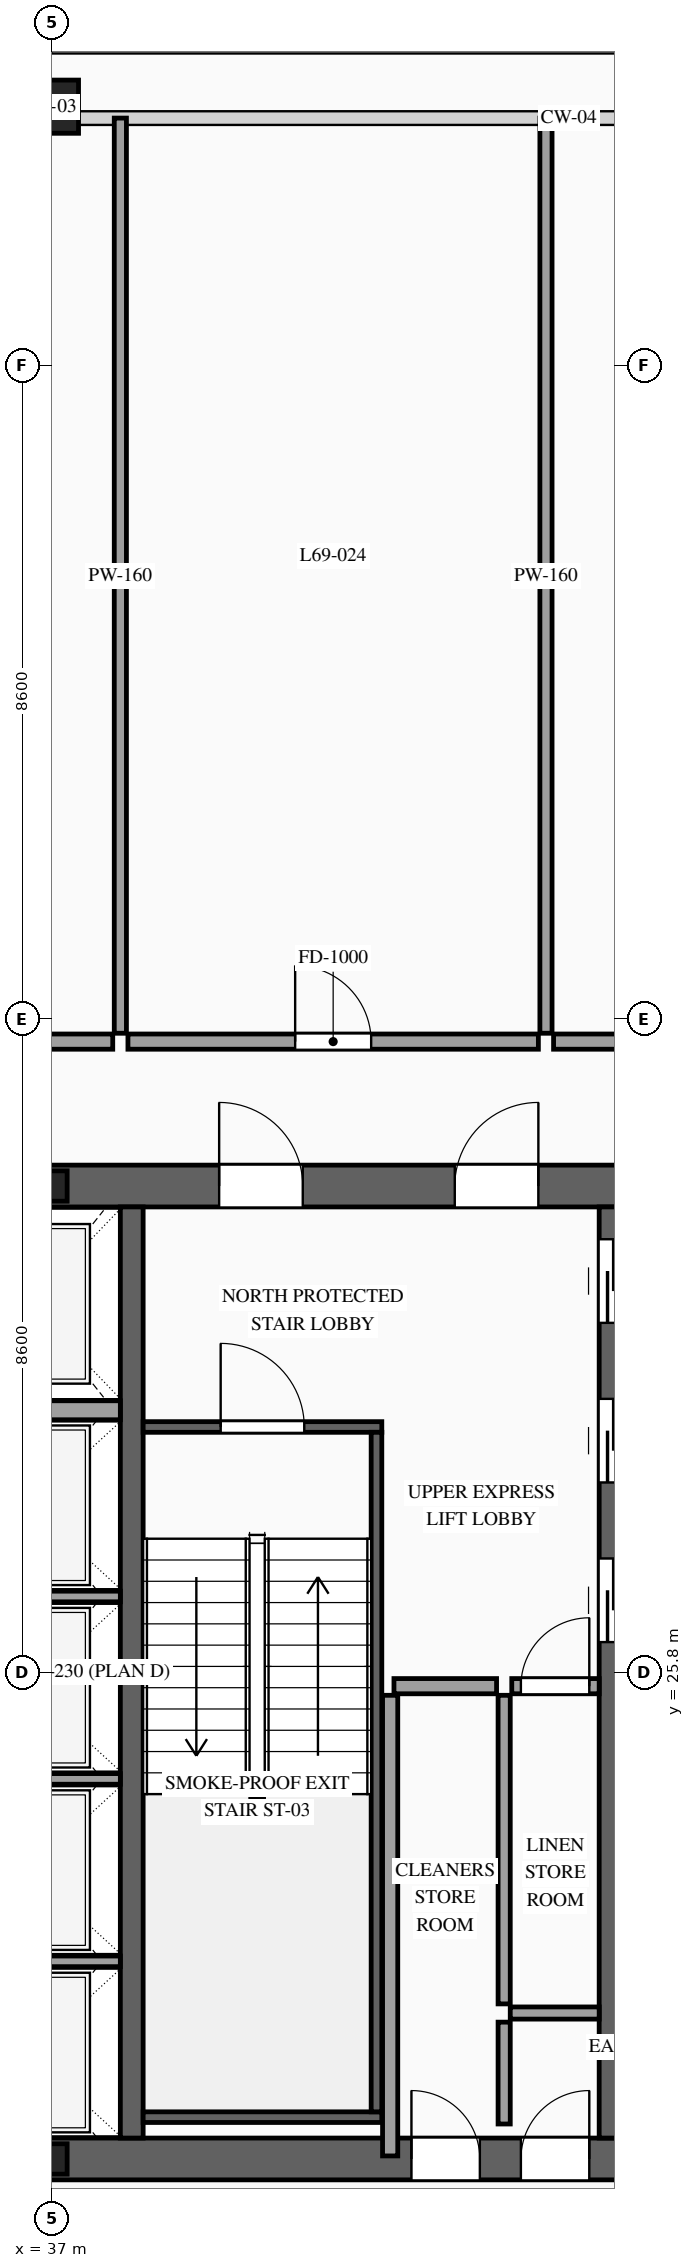
"""IFC4 building model, lengths in metres.
Left out: names, types, materials, properties, quantities, classifications, styles, units other than length and angle.
Written with IfcOpenShell. Run it as: python <this file> out.ifc"""

import sys

from ifc_helpers import new_model, si_unit, direction, frame, frame_2d, origin, origin_2d, place, context, subcontext, project, spatial, rectangle, hollow_rectangle, i_section, extrude, source, transform, mapped, element, fill, save


model = new_model("IFC4")
c1 = context("Model", 3, precision=1e-05, world=origin(), true_north=direction((0.0, 1.0)))
c2 = subcontext(c1, "Body", "Model", "MODEL_VIEW")
j1 = project(units=[si_unit("LENGTHUNIT", "METRE"), si_unit("PLANEANGLEUNIT", "RADIAN")], contexts=[c1])
p1 = place(None, origin())
s1 = spatial("IfcSite", under=j1, at=p1, CompositionType="ELEMENT")
p2 = place(p1, origin())
s2 = spatial("IfcBuilding", under=s1, at=p2, CompositionType="ELEMENT")
p3 = place(p2, frame((0.0, 0.0, 259.1)))
s3 = spatial("IfcBuildingStorey", under=s2, at=p3, CompositionType="ELEMENT", Elevation=259.1)
p4 = place(p3, frame((23.525, 19.4, 0.0), z_axis=(0.0, 0.0, 1.0), x_axis=(1.0, 0.0, 0.0)))
e1 = element("IfcWall", 1, at=p4, inside=s3, PredefinedType="SHEAR", context=c2, shape_type="SweptSolid", body=[
    extrude(rectangle(XDim=26.95, YDim=0.55, at=frame_2d((13.475, 0.0))), origin(), (0.0, 0.0, 1.0), 4.4),
])
p5 = place(p4, frame((1.925, 0.0, 0.0)))
e2 = element("IfcOpeningElement", 2, at=p5, cuts=e1, PredefinedType="OPENING", context=c2, shape_type="SweptSolid", body=[
    extrude(rectangle(XDim=1.1, YDim=2.2, at=frame_2d((0.55, 1.1))), frame((0.0, 0.29, 0.0), z_axis=(0.0, -1.0, 0.0), x_axis=(1.0, 0.0, 0.0)), (0.0, 0.0, 1.0), 0.58),
])
p6 = place(p4, frame((9.825, 0.0, 0.0)))
e3 = element("IfcOpeningElement", 3, at=p6, cuts=e1, PredefinedType="OPENING", context=c2, shape_type="SweptSolid", body=[
    extrude(rectangle(XDim=1.1, YDim=2.2, at=frame_2d((0.55, 1.1))), frame((0.0, 0.29, 0.0), z_axis=(0.0, -1.0, 0.0), x_axis=(1.0, 0.0, 0.0)), (0.0, 0.0, 1.0), 0.58),
])
p7 = place(p4, frame((23.025, 0.0, 0.0)))
e4 = element("IfcOpeningElement", 4, at=p7, cuts=e1, PredefinedType="OPENING", context=c2, shape_type="SweptSolid", body=[
    extrude(rectangle(XDim=1.1, YDim=2.2, at=frame_2d((0.55, 1.1))), frame((0.0, 0.29, 0.0), z_axis=(0.0, -1.0, 0.0), x_axis=(1.0, 0.0, 0.0)), (0.0, 0.0, 1.0), 0.58),
])
p8 = place(p4, frame((19.645, 0.0, 0.0)))
e5 = element("IfcOpeningElement", 5, at=p8, cuts=e1, PredefinedType="OPENING", context=c2, shape_type="SweptSolid", body=[
    extrude(rectangle(XDim=0.9, YDim=2.15, at=frame_2d((0.45, 1.075))), frame((0.0, 0.29, 0.0), z_axis=(0.0, -1.0, 0.0), x_axis=(1.0, 0.0, 0.0)), (0.0, 0.0, 1.0), 0.58),
])
p9 = place(p4, frame((18.205, 0.0, 0.0)))
e6 = element("IfcOpeningElement", 6, at=p9, cuts=e1, PredefinedType="OPENING", context=c2, shape_type="SweptSolid", body=[
    extrude(rectangle(XDim=0.9, YDim=2.15, at=frame_2d((0.45, 1.075))), frame((0.0, 0.29, 0.0), z_axis=(0.0, -1.0, 0.0), x_axis=(1.0, 0.0, 0.0)), (0.0, 0.0, 1.0), 0.58),
])
p10 = place(p3, frame((23.525, 32.2, 0.0), z_axis=(0.0, 0.0, 1.0), x_axis=(1.0, 0.0, 0.0)))
e7 = element("IfcWall", 7, at=p10, inside=s3, PredefinedType="SHEAR", context=c2, shape_type="SweptSolid", body=[
    extrude(rectangle(XDim=26.95, YDim=0.55, at=frame_2d((13.475, 0.0))), origin(), (0.0, 0.0, 1.0), 4.4),
])
p11 = place(p10, frame((4.545, 0.0, 0.0)))
e8 = element("IfcOpeningElement", 8, at=p11, cuts=e7, PredefinedType="OPENING", context=c2, shape_type="SweptSolid", body=[
    extrude(rectangle(XDim=0.9, YDim=2.15, at=frame_2d((0.45, 1.075))), frame((0.0, 0.29, 0.0), z_axis=(0.0, -1.0, 0.0), x_axis=(1.0, 0.0, 0.0)), (0.0, 0.0, 1.0), 0.58),
])
p12 = place(p10, frame((9.825, 0.0, 0.0)))
e9 = element("IfcOpeningElement", 9, at=p12, cuts=e7, PredefinedType="OPENING", context=c2, shape_type="SweptSolid", body=[
    extrude(rectangle(XDim=1.1, YDim=2.2, at=frame_2d((0.55, 1.1))), frame((0.0, 0.29, 0.0), z_axis=(0.0, -1.0, 0.0), x_axis=(1.0, 0.0, 0.0)), (0.0, 0.0, 1.0), 0.58),
])
p13 = place(p10, frame((15.675, 0.0, 0.0)))
e10 = element("IfcOpeningElement", 10, at=p13, cuts=e7, PredefinedType="OPENING", context=c2, shape_type="SweptSolid", body=[
    extrude(rectangle(XDim=1.1, YDim=2.2, at=frame_2d((0.55, 1.1))), frame((0.0, 0.29, 0.0), z_axis=(0.0, -1.0, 0.0), x_axis=(1.0, 0.0, 0.0)), (0.0, 0.0, 1.0), 0.58),
])
p14 = place(p10, frame((18.775, 0.0, 0.0)))
e11 = element("IfcOpeningElement", 11, at=p14, cuts=e7, PredefinedType="OPENING", context=c2, shape_type="SweptSolid", body=[
    extrude(rectangle(XDim=1.1, YDim=2.2, at=frame_2d((0.55, 1.1))), frame((0.0, 0.29, 0.0), z_axis=(0.0, -1.0, 0.0), x_axis=(1.0, 0.0, 0.0)), (0.0, 0.0, 1.0), 0.58),
])
m1 = source(origin(), c2, "Body", "SweptSolid", [
    extrude(rectangle(XDim=12.25, YDim=0.3, at=frame_2d((6.125, 0.0))), origin(), (0.0, 0.0, 1.0), 4.4),
])
p15 = place(p3, frame((38.05, 19.675, 0.0), z_axis=(0.0, 0.0, 1.0), x_axis=(0.0, 1.0, 0.0)))
e12 = element("IfcWall", 12, at=p15, inside=s3, PredefinedType="SOLIDWALL", context=c2, shape_type="MappedRepresentation", body=[
    mapped(m1, transform((0.0, 0.0, 0.0), scale=1.0)),
])
p16 = place(p3, frame((44.35, 19.675, 0.0), z_axis=(0.0, 0.0, 1.0), x_axis=(0.0, 1.0, 0.0)))
e13 = element("IfcWall", 13, at=p16, inside=s3, PredefinedType="SOLIDWALL", context=c2, shape_type="SweptSolid", body=[
    extrude(rectangle(XDim=12.25, YDim=0.3, at=frame_2d((6.125, 0.0))), origin(), (0.0, 0.0, 1.0), 4.4),
])
p17 = place(p16, frame((6.525, 0.0, 0.0)))
e14 = element("IfcOpeningElement", 14, at=p17, cuts=e13, PredefinedType="OPENING", context=c2, shape_type="SweptSolid", body=[
    extrude(rectangle(XDim=1.1, YDim=2.2, at=frame_2d((0.55, 1.1))), frame((0.0, 0.165, 0.0), z_axis=(0.0, -1.0, 0.0), x_axis=(1.0, 0.0, 0.0)), (0.0, 0.0, 1.0), 0.33),
])
p18 = place(p16, frame((8.625, 0.0, 0.0)))
e15 = element("IfcOpeningElement", 15, at=p18, cuts=e13, PredefinedType="OPENING", context=c2, shape_type="SweptSolid", body=[
    extrude(rectangle(XDim=1.1, YDim=2.2, at=frame_2d((0.55, 1.1))), frame((0.0, 0.165, 0.0), z_axis=(0.0, -1.0, 0.0), x_axis=(1.0, 0.0, 0.0)), (0.0, 0.0, 1.0), 0.33),
])
p19 = place(p16, frame((10.725, 0.0, 0.0)))
e16 = element("IfcOpeningElement", 16, at=p19, cuts=e13, PredefinedType="OPENING", context=c2, shape_type="SweptSolid", body=[
    extrude(rectangle(XDim=1.1, YDim=2.2, at=frame_2d((0.55, 1.1))), frame((0.0, 0.165, 0.0), z_axis=(0.0, -1.0, 0.0), x_axis=(1.0, 0.0, 0.0)), (0.0, 0.0, 1.0), 0.33),
])
m2 = source(origin(), c2, "Body", "SweptSolid", [
    extrude(i_section(OverallWidth=0.4, OverallDepth=0.4, WebThickness=0.013, FlangeThickness=0.021, at=origin_2d()), origin(), (0.0, 0.0, 1.0), 4.4),
])
for number, where, z_axis, x_axis in (
    (17, (37.0, 19.4, 0.0), (0.0, 0.0, 1.0), (1.0, 0.0, 0.0)),
    (18, (37.0, 32.2, 0.0), (0.0, 0.0, 1.0), (1.0, 0.0, 0.0)),
):
    element("IfcColumn", number, at=place(p3, frame(where, z_axis=z_axis, x_axis=x_axis)), inside=s3, PredefinedType="COLUMN", context=c2, shape_type="MappedRepresentation", body=[
        mapped(m2, transform((0.0, 0.0, 0.0), scale=1.0)),
    ])
m3 = source(origin(), c2, "Body", "SweptSolid", [
    extrude(hollow_rectangle(XDim=0.7, YDim=0.7, WallThickness=0.032, at=origin_2d()), origin(), (0.0, 0.0, 1.0), 4.4),
])
p20 = place(p3, frame((37.0, 46.4, 0.0), z_axis=(0.0, 0.0, 1.0), x_axis=(1.0, 0.0, 0.0)))
e19 = element("IfcColumn", 19, at=p20, inside=s3, PredefinedType="COLUMN", context=c2, shape_type="MappedRepresentation", body=[
    mapped(m3, transform((0.0, 0.0, 0.0), scale=1.0)),
])
m4 = source(origin(), c2, "Body", "SweptSolid", [
    extrude(rectangle(XDim=2.4, YDim=0.14, at=frame_2d((1.2, 0.0))), origin(), (0.0, 0.0, 1.0), 4.12),
])
for number, where, z_axis, x_axis in (
    (20, (35.5, 22.0, 0.0), (0.0, 0.0, 1.0), (1.0, 0.0, 0.0)),
    (21, (35.5, 24.4, 0.0), (0.0, 0.0, 1.0), (1.0, 0.0, 0.0)),
    (22, (35.5, 26.8, 0.0), (0.0, 0.0, 1.0), (1.0, 0.0, 0.0)),
):
    element("IfcWall", number, at=place(p3, frame(where, z_axis=z_axis, x_axis=x_axis)), inside=s3, PredefinedType="SOLIDWALL", context=c2, shape_type="MappedRepresentation", body=[
        mapped(m4, transform((0.0, 0.0, 0.0), scale=1.0)),
    ])
m5 = source(origin(), c2, "Body", "SweptSolid", [
    extrude(rectangle(XDim=2.4, YDim=0.25, at=frame_2d((1.2, 0.0))), origin(), (0.0, 0.0, 1.0), 4.12),
])
p21 = place(p3, frame((35.5, 29.25, 0.0), z_axis=(0.0, 0.0, 1.0), x_axis=(1.0, 0.0, 0.0)))
e23 = element("IfcWall", 23, at=p21, inside=s3, PredefinedType="SOLIDWALL", context=c2, shape_type="MappedRepresentation", body=[
    mapped(m5, transform((0.0, 0.0, 0.0), scale=1.0)),
])
p22 = place(p3, frame((38.2, 29.03, 0.0), z_axis=(0.0, 0.0, 1.0), x_axis=(1.0, 0.0, 0.0)))
e24 = element("IfcWall", 24, at=p22, inside=s3, PredefinedType="SOLIDWALL", context=c2, shape_type="SweptSolid", body=[
    extrude(rectangle(XDim=3.14, YDim=0.14, at=frame_2d((1.57, 0.0))), origin(), (0.0, 0.0, 1.0), 4.12),
])
p23 = place(p22, frame((1.02, 0.0, 0.0)))
e25 = element("IfcOpeningElement", 25, at=p23, cuts=e24, PredefinedType="OPENING", context=c2, shape_type="SweptSolid", body=[
    extrude(rectangle(XDim=1.1, YDim=2.2, at=frame_2d((0.55, 1.1))), frame((0.0, 0.085, 0.0), z_axis=(0.0, -1.0, 0.0), x_axis=(1.0, 0.0, 0.0)), (0.0, 0.0, 1.0), 0.17),
])
m6 = source(origin(), c2, "Body", "SweptSolid", [
    extrude(rectangle(XDim=3.14, YDim=0.14, at=frame_2d((1.57, 0.0))), origin(), (0.0, 0.0, 1.0), 4.12),
])
p24 = place(p3, frame((38.2, 19.95, 0.0), z_axis=(0.0, 0.0, 1.0), x_axis=(1.0, 0.0, 0.0)))
e26 = element("IfcWall", 26, at=p24, inside=s3, PredefinedType="SOLIDWALL", context=c2, shape_type="MappedRepresentation", body=[
    mapped(m6, transform((0.0, 0.0, 0.0), scale=1.0)),
])
m7 = source(origin(), c2, "Body", "SweptSolid", [
    extrude(rectangle(XDim=8.94, YDim=0.14, at=frame_2d((4.47, 0.0))), origin(), (0.0, 0.0, 1.0), 4.12),
])
p25 = place(p3, frame((41.27, 20.02, 0.0), z_axis=(0.0, 0.0, 1.0), x_axis=(0.0, 1.0, 0.0)))
e27 = element("IfcWall", 27, at=p25, inside=s3, PredefinedType="SOLIDWALL", context=c2, shape_type="MappedRepresentation", body=[
    mapped(m7, transform((0.0, 0.0, 0.0), scale=1.0)),
])
m8 = source(origin(), c2, "Body", "SweptSolid", [
    extrude(rectangle(XDim=1.34, YDim=0.16, at=frame_2d((0.67, 0.0))), origin(), (0.0, 0.0, 1.0), 4.12),
])
p26 = place(p3, frame((42.95, 19.86, 0.0), z_axis=(0.0, 0.0, 1.0), x_axis=(0.0, 1.0, 0.0)))
e28 = element("IfcWall", 28, at=p26, inside=s3, PredefinedType="PARTITIONING", context=c2, shape_type="MappedRepresentation", body=[
    mapped(m8, transform((0.0, 0.0, 0.0), scale=1.0)),
])
m9 = source(origin(), c2, "Body", "SweptSolid", [
    extrude(rectangle(XDim=1.17, YDim=0.16, at=frame_2d((0.585, 0.0))), origin(), (0.0, 0.0, 1.0), 4.12),
])
p27 = place(p3, frame((43.03, 21.32, 0.0), z_axis=(0.0, 0.0, 1.0), x_axis=(1.0, 0.0, 0.0)))
e29 = element("IfcWall", 29, at=p27, inside=s3, PredefinedType="PARTITIONING", context=c2, shape_type="MappedRepresentation", body=[
    mapped(m9, transform((0.0, 0.0, 0.0), scale=1.0)),
])
m10 = source(origin(), c2, "Body", "SweptSolid", [
    extrude(rectangle(XDim=6.06, YDim=0.2, at=frame_2d((3.03, 0.0))), origin(), (0.0, 0.0, 1.0), 4.12),
])
p28 = place(p3, frame((41.45, 19.44, 0.0), z_axis=(0.0, 0.0, 1.0), x_axis=(0.0, 1.0, 0.0)))
e30 = element("IfcWall", 30, at=p28, inside=s3, PredefinedType="PARTITIONING", context=c2, shape_type="MappedRepresentation", body=[
    mapped(m10, transform((0.0, 0.0, 0.0), scale=1.0)),
])
m11 = source(origin(), c2, "Body", "SweptSolid", [
    extrude(rectangle(XDim=1.35, YDim=0.2, at=frame_2d((0.675, 0.0))), origin(), (0.0, 0.0, 1.0), 4.12),
])
p29 = place(p3, frame((41.5, 25.62, 0.0), z_axis=(0.0, 0.0, 1.0), x_axis=(1.0, 0.0, 0.0)))
e31 = element("IfcWall", 31, at=p29, inside=s3, PredefinedType="PARTITIONING", context=c2, shape_type="MappedRepresentation", body=[
    mapped(m11, transform((0.0, 0.0, 0.0), scale=1.0)),
])
m12 = source(origin(), c2, "Body", "SweptSolid", [
    extrude(rectangle(XDim=4.06, YDim=0.16, at=frame_2d((2.03, 0.0))), origin(), (0.0, 0.0, 1.0), 4.12),
])
p30 = place(p3, frame((42.95, 21.44, 0.0), z_axis=(0.0, 0.0, 1.0), x_axis=(0.0, 1.0, 0.0)))
e32 = element("IfcWall", 32, at=p30, inside=s3, PredefinedType="PARTITIONING", context=c2, shape_type="MappedRepresentation", body=[
    mapped(m12, transform((0.0, 0.0, 0.0), scale=1.0)),
])
p31 = place(p3, frame((43.05, 25.62, 0.0), z_axis=(0.0, 0.0, 1.0), x_axis=(1.0, 0.0, 0.0)))
e33 = element("IfcWall", 33, at=p31, inside=s3, PredefinedType="PARTITIONING", context=c2, shape_type="SweptSolid", body=[
    extrude(rectangle(XDim=1.15, YDim=0.2, at=frame_2d((0.575, 0.0))), origin(), (0.0, 0.0, 1.0), 4.12),
])
p32 = place(p31, frame((0.12, 0.0, 0.0)))
e34 = element("IfcOpeningElement", 34, at=p32, cuts=e33, PredefinedType="OPENING", context=c2, shape_type="SweptSolid", body=[
    extrude(rectangle(XDim=0.9, YDim=2.15, at=frame_2d((0.45, 1.075))), frame((0.0, 0.115, 0.0), z_axis=(0.0, -1.0, 0.0), x_axis=(1.0, 0.0, 0.0)), (0.0, 0.0, 1.0), 0.23),
])
p33 = place(p3, frame((34.2, 34.1, 0.0), z_axis=(0.0, 0.0, 1.0), x_axis=(1.0, 0.0, 0.0)))
e35 = element("IfcWall", 35, at=p33, inside=s3, PredefinedType="PARTITIONING", context=c2, shape_type="SweptSolid", body=[
    extrude(rectangle(XDim=3.6, YDim=0.2, at=frame_2d((1.8, 0.0))), origin(), (0.0, 0.0, 1.0), 4.12),
])
p34 = place(p33, frame((1.3, 0.0, 0.0)))
e36 = element("IfcOpeningElement", 36, at=p34, cuts=e35, PredefinedType="OPENING", context=c2, shape_type="SweptSolid", body=[
    extrude(rectangle(XDim=1.0, YDim=2.2, at=frame_2d((0.5, 1.1))), frame((0.0, 0.115, 0.0), z_axis=(0.0, -1.0, 0.0), x_axis=(1.0, 0.0, 0.0)), (0.0, 0.0, 1.0), 0.23),
])
m13 = source(origin(), c2, "Body", "SweptSolid", [
    extrude(rectangle(XDim=12.04, YDim=0.16, at=frame_2d((6.02, 0.0))), origin(), (0.0, 0.0, 1.0), 4.12),
])
p35 = place(p3, frame((37.9, 34.21, 0.0), z_axis=(0.0, 0.0, 1.0), x_axis=(0.0, 1.0, 0.0)))
e37 = element("IfcWall", 37, at=p35, inside=s3, PredefinedType="PARTITIONING", context=c2, shape_type="MappedRepresentation", body=[
    mapped(m13, transform((0.0, 0.0, 0.0), scale=1.0)),
])
p36 = place(p3, frame((38.0, 34.1, 0.0), z_axis=(0.0, 0.0, 1.0), x_axis=(1.0, 0.0, 0.0)))
e38 = element("IfcWall", 38, at=p36, inside=s3, PredefinedType="PARTITIONING", context=c2, shape_type="SweptSolid", body=[
    extrude(rectangle(XDim=5.4, YDim=0.2, at=frame_2d((2.7, 0.0))), origin(), (0.0, 0.0, 1.0), 4.12),
])
p37 = place(p36, frame((2.2, 0.0, 0.0)))
e39 = element("IfcOpeningElement", 39, at=p37, cuts=e38, PredefinedType="OPENING", context=c2, shape_type="SweptSolid", body=[
    extrude(rectangle(XDim=1.0, YDim=2.2, at=frame_2d((0.5, 1.1))), frame((0.0, 0.115, 0.0), z_axis=(0.0, -1.0, 0.0), x_axis=(1.0, 0.0, 0.0)), (0.0, 0.0, 1.0), 0.23),
])
p38 = place(p3, frame((43.5, 34.21, 0.0), z_axis=(0.0, 0.0, 1.0), x_axis=(0.0, 1.0, 0.0)))
e40 = element("IfcWall", 40, at=p38, inside=s3, PredefinedType="PARTITIONING", context=c2, shape_type="MappedRepresentation", body=[
    mapped(m13, transform((0.0, 0.0, 0.0), scale=1.0)),
])
p39 = place(p3, frame((43.6, 34.1, 0.0), z_axis=(0.0, 0.0, 1.0), x_axis=(1.0, 0.0, 0.0)))
e41 = element("IfcWall", 41, at=p39, inside=s3, PredefinedType="PARTITIONING", context=c2, shape_type="SweptSolid", body=[
    extrude(rectangle(XDim=4.4, YDim=0.2, at=frame_2d((2.2, 0.0))), origin(), (0.0, 0.0, 1.0), 4.12),
])
p40 = place(p39, frame((1.7, 0.0, 0.0)))
e42 = element("IfcOpeningElement", 42, at=p40, cuts=e41, PredefinedType="OPENING", context=c2, shape_type="SweptSolid", body=[
    extrude(rectangle(XDim=1.0, YDim=2.2, at=frame_2d((0.5, 1.1))), frame((0.0, 0.115, 0.0), z_axis=(0.0, -1.0, 0.0), x_axis=(1.0, 0.0, 0.0)), (0.0, 0.0, 1.0), 0.23),
])
m14 = source(origin(), c2, "Body", "SweptSolid", [
    extrude(rectangle(XDim=1.1, YDim=2.2, at=frame_2d((0.55, 1.1))), frame((0.0, 0.025, 0.0), z_axis=(0.0, -1.0, 0.0), x_axis=(1.0, 0.0, 0.0)), (0.0, 0.0, 1.0), 0.05),
])
p41 = place(p17, origin())
e43 = element("IfcDoor", 43, at=p41, inside=s3, OperationType="SLIDING_TO_LEFT", PredefinedType="DOOR", context=c2, shape_type="MappedRepresentation", body=[
    mapped(m14, transform((0.0, 0.0, 0.0), scale=1.0)),
])
fill(e14, e43)
p42 = place(p18, origin())
e44 = element("IfcDoor", 44, at=p42, inside=s3, OperationType="SLIDING_TO_RIGHT", PredefinedType="DOOR", context=c2, shape_type="MappedRepresentation", body=[
    mapped(m14, transform((0.0, 0.0, 0.0), scale=1.0)),
])
fill(e15, e44)
p43 = place(p19, origin())
e45 = element("IfcDoor", 45, at=p43, inside=s3, OperationType="SLIDING_TO_LEFT", PredefinedType="DOOR", context=c2, shape_type="MappedRepresentation", body=[
    mapped(m14, transform((0.0, 0.0, 0.0), scale=1.0)),
])
fill(e16, e45)
m15 = source(origin(), c2, "Body", "SweptSolid", [
    extrude(rectangle(XDim=1.1, YDim=2.2, at=frame_2d((0.55, 1.1))), frame((0.0, 0.025, 0.0), z_axis=(0.0, -1.0, 0.0), x_axis=(1.0, 0.0, 0.0)), (0.0, 0.0, 1.0), 0.05),
])
p44 = place(p23, origin())
e46 = element("IfcDoor", 46, at=p44, inside=s3, OperationType="SINGLE_SWING_LEFT", PredefinedType="DOOR", context=c2, shape_type="MappedRepresentation", body=[
    mapped(m15, transform((0.0, 0.0, 0.0), scale=1.0)),
])
fill(e25, e46)
p45 = place(p13, origin())
e47 = element("IfcDoor", 47, at=p45, inside=s3, OperationType="SINGLE_SWING_LEFT", PredefinedType="DOOR", context=c2, shape_type="MappedRepresentation", body=[
    mapped(m15, transform((0.0, 0.0, 0.0), scale=1.0)),
])
fill(e10, e47)
p46 = place(p14, origin())
e48 = element("IfcDoor", 48, at=p46, inside=s3, OperationType="SINGLE_SWING_RIGHT", PredefinedType="DOOR", context=c2, shape_type="MappedRepresentation", body=[
    mapped(m15, transform((0.0, 0.0, 0.0), scale=1.0)),
])
fill(e11, e48)
m16 = source(origin(), c2, "Body", "SweptSolid", [
    extrude(rectangle(XDim=0.9, YDim=2.15, at=frame_2d((0.45, 1.075))), frame((0.0, 0.025, 0.0), z_axis=(0.0, -1.0, 0.0), x_axis=(1.0, 0.0, 0.0)), (0.0, 0.0, 1.0), 0.05),
])
p47 = place(p8, origin())
e49 = element("IfcDoor", 49, at=p47, inside=s3, OperationType="SINGLE_SWING_RIGHT", PredefinedType="DOOR", context=c2, shape_type="MappedRepresentation", body=[
    mapped(m16, transform((0.0, 0.0, 0.0), scale=1.0)),
])
fill(e5, e49)
p48 = place(p9, origin())
e50 = element("IfcDoor", 50, at=p48, inside=s3, OperationType="SINGLE_SWING_LEFT", PredefinedType="DOOR", context=c2, shape_type="MappedRepresentation", body=[
    mapped(m16, transform((0.0, 0.0, 0.0), scale=1.0)),
])
fill(e6, e50)
p49 = place(p32, origin())
e51 = element("IfcDoor", 51, at=p49, inside=s3, OperationType="SINGLE_SWING_RIGHT", PredefinedType="DOOR", context=c2, shape_type="MappedRepresentation", body=[
    mapped(m16, transform((0.0, 0.0, 0.0), scale=1.0)),
])
fill(e34, e51)
m17 = source(origin(), c2, "Body", "SweptSolid", [
    extrude(rectangle(XDim=1.0, YDim=2.2, at=frame_2d((0.5, 1.1))), frame((0.0, 0.025, 0.0), z_axis=(0.0, -1.0, 0.0), x_axis=(1.0, 0.0, 0.0)), (0.0, 0.0, 1.0), 0.05),
])
p50 = place(p37, origin())
e52 = element("IfcDoor", 52, at=p50, inside=s3, OperationType="SINGLE_SWING_LEFT", PredefinedType="DOOR", context=c2, shape_type="MappedRepresentation", body=[
    mapped(m17, transform((0.0, 0.0, 0.0), scale=1.0)),
])
fill(e39, e52)
save(model, sys.argv[1])
